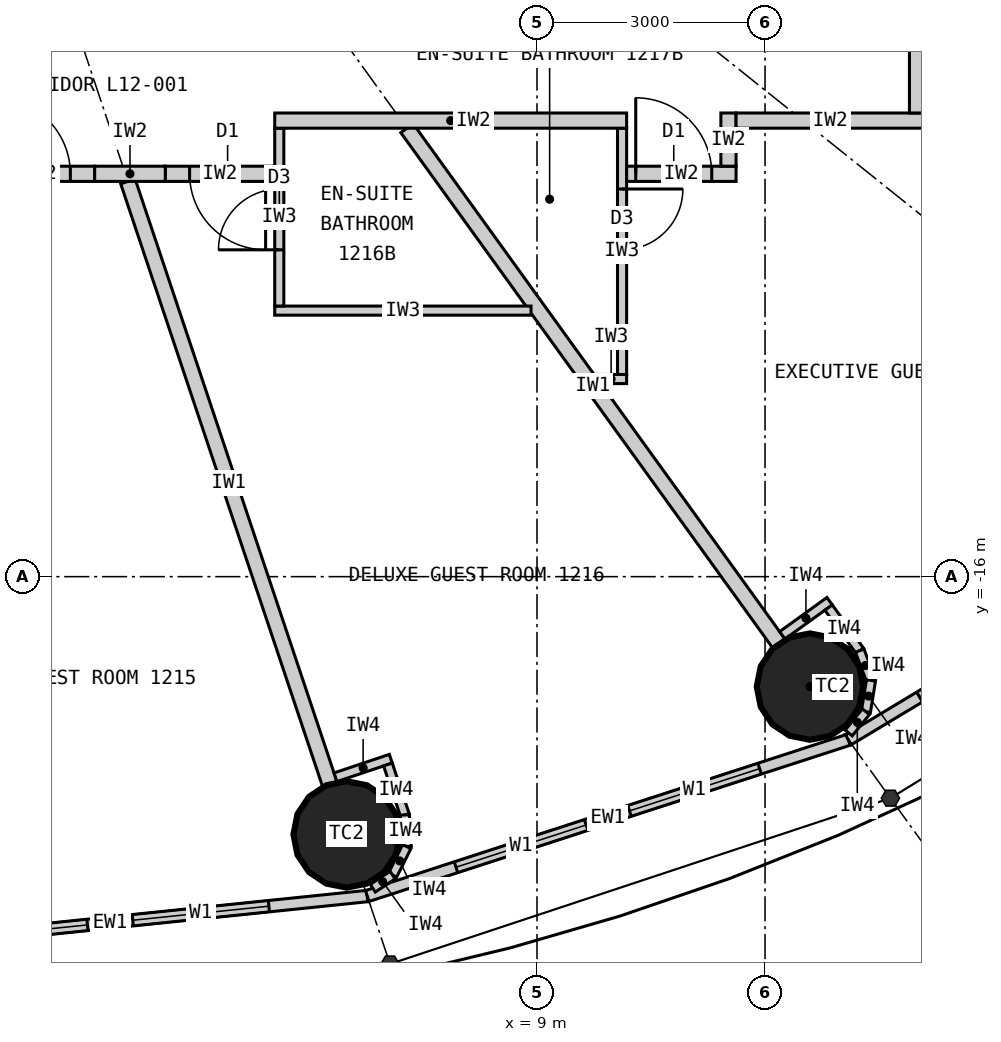
"""IFC4 building model, lengths in metres.
Left out: names, types, materials, properties, quantities, classifications, styles, units other than length and angle.
Written with IfcOpenShell. Run it as: python <this file> out.ifc"""

import sys

from ifc_helpers import new_model, si_unit, direction, frame, frame_2d, origin, origin_2d, place, context, subcontext, project, spatial, rectangle, circle, extrude, element, fill, save


model = new_model("IFC4")
c1 = context("Model", 3, precision=1e-05, world=origin(), true_north=direction((0.0, 1.0)))
c2 = subcontext(c1, "Body", "Model", "MODEL_VIEW")
j1 = project(units=[si_unit("LENGTHUNIT", "METRE"), si_unit("PLANEANGLEUNIT", "RADIAN")], contexts=[c1])
p1 = place(None, origin())
s1 = spatial("IfcSite", under=j1, at=p1, CompositionType="ELEMENT")
p2 = place(p1, origin())
s2 = spatial("IfcBuilding", under=s1, at=p2, CompositionType="ELEMENT")
p3 = place(p2, frame((0.0, 0.0, 54.0)))
s3 = spatial("IfcBuildingStorey", under=s2, at=p3, CompositionType="ELEMENT", Elevation=54.0)
for number, where, z_axis, x_axis in (
    (1, (6.495, -19.391, 0.0), (0.0, 0.0, 1.0), (1.0, 0.0, 0.0)),
    (2, (12.591, -17.447, 0.0), (0.0, 0.0, 1.0), (1.0, 0.0, 0.0)),
):
    element("IfcColumn", number, at=place(p3, frame(where, z_axis=z_axis, x_axis=x_axis)), inside=s3, PredefinedType="COLUMN", context=c2, shape_type="SweptSolid", body=[
        extrude(circle(Radius=0.7, at=origin_2d()), origin(), (0.0, 0.0, 1.0), 3.3),
    ])
p4 = place(p3, frame((0.0, -20.9, 0.0), z_axis=(0.0, 0.0, 1.0), x_axis=(0.994721394369, 0.102612609291, 0.0)))
e3 = element("IfcWall", 3, at=p4, inside=s3, PredefinedType="ELEMENTEDWALL", context=c2, shape_type="SweptSolid", body=[
    extrude(rectangle(XDim=6.802, YDim=0.15, at=frame_2d((3.401, 0.0))), origin(), (0.0, 0.0, 1.0), 3.12),
])
p5 = place(p4, frame((1.301, 0.0, 0.9)))
e4 = element("IfcOpeningElement", 4, at=p5, cuts=e3, PredefinedType="OPENING", context=c2, shape_type="SweptSolid", body=[
    extrude(rectangle(XDim=1.8, YDim=1.9, at=frame_2d((0.9, 0.95))), frame((0.0, 0.085, 0.0), z_axis=(0.0, -1.0, 0.0), x_axis=(1.0, 0.0, 0.0)), (0.0, 0.0, 1.0), 0.17),
])
p6 = place(p4, frame((3.701, 0.0, 0.9)))
e5 = element("IfcOpeningElement", 5, at=p6, cuts=e3, PredefinedType="OPENING", context=c2, shape_type="SweptSolid", body=[
    extrude(rectangle(XDim=1.8, YDim=1.9, at=frame_2d((0.9, 0.95))), frame((0.0, 0.085, 0.0), z_axis=(0.0, -1.0, 0.0), x_axis=(1.0, 0.0, 0.0)), (0.0, 0.0, 1.0), 0.17),
])
p7 = place(p3, frame((6.766, -20.202, 0.0), z_axis=(0.0, 0.0, 1.0), x_axis=(0.951137534625, 0.308767534285, 0.0)))
e6 = element("IfcWall", 6, at=p7, inside=s3, PredefinedType="ELEMENTEDWALL", context=c2, shape_type="SweptSolid", body=[
    extrude(rectangle(XDim=6.655, YDim=0.15, at=frame_2d((3.328, 0.0))), origin(), (0.0, 0.0, 1.0), 3.12),
])
p8 = place(p7, frame((1.228, 0.0, 0.9)))
e7 = element("IfcOpeningElement", 7, at=p8, cuts=e6, PredefinedType="OPENING", context=c2, shape_type="SweptSolid", body=[
    extrude(rectangle(XDim=1.8, YDim=1.9, at=frame_2d((0.9, 0.95))), frame((0.0, 0.085, 0.0), z_axis=(0.0, -1.0, 0.0), x_axis=(1.0, 0.0, 0.0)), (0.0, 0.0, 1.0), 0.17),
])
p9 = place(p7, frame((3.628, 0.0, 0.9)))
e8 = element("IfcOpeningElement", 8, at=p9, cuts=e6, PredefinedType="OPENING", context=c2, shape_type="SweptSolid", body=[
    extrude(rectangle(XDim=1.8, YDim=1.9, at=frame_2d((0.9, 0.95))), frame((0.0, 0.085, 0.0), z_axis=(0.0, -1.0, 0.0), x_axis=(1.0, 0.0, 0.0)), (0.0, 0.0, 1.0), 0.17),
])
p10 = place(p3, frame((13.096, -18.147, 0.0), z_axis=(0.0, 0.0, 1.0), x_axis=(0.856983180864, 0.515344377787, 0.0)))
e9 = element("IfcWall", 9, at=p10, inside=s3, PredefinedType="ELEMENTEDWALL", context=c2, shape_type="SweptSolid", body=[
    extrude(rectangle(XDim=6.386, YDim=0.15, at=frame_2d((3.193, 0.0))), origin(), (0.0, 0.0, 1.0), 3.12),
])
p11 = place(p10, frame((1.093, 0.0, 0.9)))
e10 = element("IfcOpeningElement", 10, at=p11, cuts=e9, PredefinedType="OPENING", context=c2, shape_type="SweptSolid", body=[
    extrude(rectangle(XDim=1.8, YDim=1.9, at=frame_2d((0.9, 0.95))), frame((0.0, 0.085, 0.0), z_axis=(0.0, -1.0, 0.0), x_axis=(1.0, 0.0, 0.0)), (0.0, 0.0, 1.0), 0.17),
])
p12 = place(p10, frame((3.493, 0.0, 0.9)))
e11 = element("IfcOpeningElement", 11, at=p12, cuts=e9, PredefinedType="OPENING", context=c2, shape_type="SweptSolid", body=[
    extrude(rectangle(XDim=1.8, YDim=1.9, at=frame_2d((0.9, 0.95))), frame((0.0, 0.085, 0.0), z_axis=(0.0, -1.0, 0.0), x_axis=(1.0, 0.0, 0.0)), (0.0, 0.0, 1.0), 0.17),
])
p13 = place(p3, frame((3.617, -10.8, 0.0), z_axis=(0.0, 0.0, 1.0), x_axis=(0.317576599239, -0.948232621046, 0.0)))
e12 = element("IfcWall", 12, at=p13, inside=s3, PredefinedType="PARTITIONING", context=c2, shape_type="SweptSolid", body=[
    extrude(rectangle(XDim=8.36, YDim=0.2, at=frame_2d((4.18, 0.0))), origin(), (0.0, 0.0, 1.0), 2.32),
])
p14 = place(p3, frame((7.289, -10.1, 0.0), z_axis=(0.0, 0.0, 1.0), x_axis=(0.585198353053, -0.810890182197, 0.0)))
e13 = element("IfcWall", 13, at=p14, inside=s3, PredefinedType="PARTITIONING", context=c2, shape_type="SweptSolid", body=[
    extrude(rectangle(XDim=8.36, YDim=0.2, at=frame_2d((4.18, 0.0))), origin(), (0.0, 0.0, 1.0), 2.32),
])
p15 = place(p3, frame((14.1, -8.639, 0.0), z_axis=(0.0, 0.0, 1.0), x_axis=(0.852672493023, -0.522445805459, 0.0)))
e14 = element("IfcWall", 14, at=p15, inside=s3, PredefinedType="PARTITIONING", context=c2, shape_type="SweptSolid", body=[
    extrude(rectangle(XDim=7.633, YDim=0.2, at=frame_2d((3.817, 0.0))), origin(), (0.0, 0.0, 1.0), 3.12),
])
p16 = place(p3, frame((8.921, -12.5, 0.0), z_axis=(0.0, 0.0, 1.0), x_axis=(-1.0, 0.0, 0.0)))
e15 = element("IfcWall", 15, at=p16, inside=s3, PredefinedType="PARTITIONING", context=c2, shape_type="SweptSolid", body=[
    extrude(rectangle(XDim=3.372, YDim=0.12, at=frame_2d((1.686, 0.0))), origin(), (0.0, 0.0, 1.0), 3.12),
])
p17 = place(p3, frame((5.609, -10.1, 0.0), z_axis=(0.0, 0.0, 1.0), x_axis=(0.0, -1.0, 0.0)))
e16 = element("IfcWall", 16, at=p17, inside=s3, PredefinedType="PARTITIONING", context=c2, shape_type="SweptSolid", body=[
    extrude(rectangle(XDim=2.34, YDim=0.12, at=frame_2d((1.17, 0.0))), origin(), (0.0, 0.0, 1.0), 3.12),
])
p18 = place(p17, frame((0.8, 0.0, 0.0)))
e17 = element("IfcOpeningElement", 17, at=p18, cuts=e16, PredefinedType="OPENING", context=c2, shape_type="SweptSolid", body=[
    extrude(rectangle(XDim=0.8, YDim=2.1, at=frame_2d((0.4, 1.05))), frame((0.0, 0.07, 0.0), z_axis=(0.0, -1.0, 0.0), x_axis=(1.0, 0.0, 0.0)), (0.0, 0.0, 1.0), 0.14),
])
p19 = place(p3, frame((9.771, -13.4, 0.0), z_axis=(0.0, 0.0, 1.0), x_axis=(1.0, 0.0, 0.0)))
e18 = element("IfcWall", 18, at=p19, inside=s3, PredefinedType="PARTITIONING", context=c2, shape_type="SweptSolid", body=[
    extrude(rectangle(XDim=0.408, YDim=0.12, at=frame_2d((0.204, 0.0))), origin(), (0.0, 0.0, 1.0), 3.12),
])
p20 = place(p3, frame((10.119, -10.1, 0.0), z_axis=(0.0, 0.0, 1.0), x_axis=(0.0, -1.0, 0.0)))
e19 = element("IfcWall", 19, at=p20, inside=s3, PredefinedType="PARTITIONING", context=c2, shape_type="SweptSolid", body=[
    extrude(rectangle(XDim=3.24, YDim=0.12, at=frame_2d((1.62, 0.0))), origin(), (0.0, 0.0, 1.0), 3.12),
])
p21 = place(p20, frame((0.8, 0.0, 0.0)))
e20 = element("IfcOpeningElement", 20, at=p21, cuts=e19, PredefinedType="OPENING", context=c2, shape_type="SweptSolid", body=[
    extrude(rectangle(XDim=0.8, YDim=2.1, at=frame_2d((0.4, 1.05))), frame((0.0, 0.07, 0.0), z_axis=(0.0, -1.0, 0.0), x_axis=(1.0, 0.0, 0.0)), (0.0, 0.0, 1.0), 0.14),
])
p22 = place(p3, frame((3.18, -10.7, 0.0), z_axis=(0.0, 0.0, 1.0), x_axis=(-1.0, 0.0, 0.0)))
e21 = element("IfcWall", 21, at=p22, inside=s3, PredefinedType="PARTITIONING", context=c2, shape_type="SweptSolid", body=[
    extrude(rectangle(XDim=1.44, YDim=0.2, at=frame_2d((0.72, 0.0))), origin(), (0.0, 0.0, 1.0), 3.12),
])
p23 = place(p22, frame((0.32, 0.0, 0.0)))
e22 = element("IfcOpeningElement", 22, at=p23, cuts=e21, PredefinedType="OPENING", context=c2, shape_type="SweptSolid", body=[
    extrude(rectangle(XDim=1.0, YDim=2.2, at=frame_2d((0.5, 1.1))), frame((0.0, 0.11, 0.0), z_axis=(0.0, -1.0, 0.0), x_axis=(1.0, 0.0, 0.0)), (0.0, 0.0, 1.0), 0.22),
])
p24 = place(p3, frame((5.549, -10.7, 0.0), z_axis=(0.0, 0.0, 1.0), x_axis=(-1.0, 0.0, 0.0)))
e23 = element("IfcWall", 23, at=p24, inside=s3, PredefinedType="PARTITIONING", context=c2, shape_type="SweptSolid", body=[
    extrude(rectangle(XDim=1.44, YDim=0.2, at=frame_2d((0.72, 0.0))), origin(), (0.0, 0.0, 1.0), 3.12),
])
p25 = place(p24, frame((0.12, 0.0, 0.0)))
e24 = element("IfcOpeningElement", 24, at=p25, cuts=e23, PredefinedType="OPENING", context=c2, shape_type="SweptSolid", body=[
    extrude(rectangle(XDim=1.0, YDim=2.2, at=frame_2d((0.5, 1.1))), frame((0.0, 0.11, 0.0), z_axis=(0.0, -1.0, 0.0), x_axis=(1.0, 0.0, 0.0)), (0.0, 0.0, 1.0), 0.22),
])
p26 = place(p3, frame((11.619, -10.7, 0.0), z_axis=(0.0, 0.0, 1.0), x_axis=(-1.0, 0.0, 0.0)))
e25 = element("IfcWall", 25, at=p26, inside=s3, PredefinedType="PARTITIONING", context=c2, shape_type="SweptSolid", body=[
    extrude(rectangle(XDim=1.44, YDim=0.2, at=frame_2d((0.72, 0.0))), origin(), (0.0, 0.0, 1.0), 3.12),
])
p27 = place(p26, frame((0.32, 0.0, 0.0)))
e26 = element("IfcOpeningElement", 26, at=p27, cuts=e25, PredefinedType="OPENING", context=c2, shape_type="SweptSolid", body=[
    extrude(rectangle(XDim=1.0, YDim=2.2, at=frame_2d((0.5, 1.1))), frame((0.0, 0.11, 0.0), z_axis=(0.0, -1.0, 0.0), x_axis=(1.0, 0.0, 0.0)), (0.0, 0.0, 1.0), 0.22),
])
p28 = place(p3, frame((11.519, -9.9, 0.0), z_axis=(0.0, 0.0, 1.0), x_axis=(0.0, -1.0, 0.0)))
e27 = element("IfcWall", 27, at=p28, inside=s3, PredefinedType="PARTITIONING", context=c2, shape_type="SweptSolid", body=[
    extrude(rectangle(XDim=0.7, YDim=0.2, at=frame_2d((0.35, 0.0))), origin(), (0.0, 0.0, 1.0), 3.12),
])
p29 = place(p3, frame((4.109, -10.7, 0.0), z_axis=(0.0, 0.0, 1.0), x_axis=(-1.0, 0.0, 0.0)))
e28 = element("IfcWall", 28, at=p29, inside=s3, PredefinedType="PARTITIONING", context=c2, shape_type="SweptSolid", body=[
    extrude(rectangle(XDim=0.929, YDim=0.2, at=frame_2d((0.465, 0.0))), origin(), (0.0, 0.0, 1.0), 3.12),
])
p30 = place(p3, frame((14.1, -10.0, 0.0), z_axis=(0.0, 0.0, 1.0), x_axis=(-1.0, 0.0, 0.0)))
e29 = element("IfcWall", 29, at=p30, inside=s3, PredefinedType="PARTITIONING", context=c2, shape_type="SweptSolid", body=[
    extrude(rectangle(XDim=2.481, YDim=0.2, at=frame_2d((1.24, 0.0))), origin(), (0.0, 0.0, 1.0), 3.12),
])
p31 = place(p3, frame((10.179, -10.0, 0.0), z_axis=(0.0, 0.0, 1.0), x_axis=(-1.0, 0.0, 0.0)))
e30 = element("IfcWall", 30, at=p31, inside=s3, PredefinedType="PARTITIONING", context=c2, shape_type="SweptSolid", body=[
    extrude(rectangle(XDim=4.63, YDim=0.2, at=frame_2d((2.315, 0.0))), origin(), (0.0, 0.0, 1.0), 3.12),
])
p32 = place(p3, frame((14.0, -9.9, 0.0), z_axis=(0.0, 0.0, 1.0), x_axis=(0.0, 1.0, 0.0)))
e31 = element("IfcWall", 31, at=p32, inside=s3, PredefinedType="PARTITIONING", context=c2, shape_type="SweptSolid", body=[
    extrude(rectangle(XDim=3.001, YDim=0.2, at=frame_2d((1.5, 0.0))), origin(), (0.0, 0.0, 1.0), 3.12),
])
p33 = place(p3, frame((6.348, -18.639, 0.0), z_axis=(0.0, 0.0, 1.0), x_axis=(0.948268951266, 0.317468102437, 0.0)))
e32 = element("IfcWall", 32, at=p33, inside=s3, PredefinedType="PARTITIONING", context=c2, shape_type="SweptSolid", body=[
    extrude(rectangle(XDim=0.768, YDim=0.12, at=frame_2d((0.384, 0.0))), origin(), (0.0, 0.0, 1.0), 3.12),
])
p34 = place(p3, frame((7.038, -18.471, 0.0), z_axis=(0.0, 0.0, 1.0), x_axis=(0.317378466199, -0.9482989556, 0.0)))
e33 = element("IfcWall", 33, at=p34, inside=s3, PredefinedType="PARTITIONING", context=c2, shape_type="SweptSolid", body=[
    extrude(rectangle(XDim=0.7, YDim=0.12, at=frame_2d((0.35, 0.0))), origin(), (0.0, 0.0, 1.0), 3.12),
])
p35 = place(p3, frame((7.26, -19.135, 0.0), z_axis=(0.0, 0.0, 1.0), x_axis=(0.0613238046, -0.99811792439, 0.0)))
e34 = element("IfcWall", 34, at=p35, inside=s3, PredefinedType="PARTITIONING", context=c2, shape_type="SweptSolid", body=[
    extrude(rectangle(XDim=0.418, YDim=0.12, at=frame_2d((0.209, 0.0))), origin(), (0.0, 0.0, 1.0), 3.12),
])
p36 = place(p3, frame((7.286, -19.552, 0.0), z_axis=(0.0, 0.0, 1.0), x_axis=(-0.445810757773, -0.89512723579, 0.0)))
e35 = element("IfcWall", 35, at=p36, inside=s3, PredefinedType="PARTITIONING", context=c2, shape_type="SweptSolid", body=[
    extrude(rectangle(XDim=0.418, YDim=0.12, at=frame_2d((0.209, 0.0))), origin(), (0.0, 0.0, 1.0), 3.12),
])
p37 = place(p3, frame((7.1, -19.926, 0.0), z_axis=(0.0, 0.0, 1.0), x_axis=(-0.833488262509, -0.552537162787, 0.0)))
e36 = element("IfcWall", 36, at=p37, inside=s3, PredefinedType="PARTITIONING", context=c2, shape_type="SweptSolid", body=[
    extrude(rectangle(XDim=0.313, YDim=0.12, at=frame_2d((0.156, 0.0))), origin(), (0.0, 0.0, 1.0), 3.12),
])
p38 = place(p3, frame((12.227, -16.772, 0.0), z_axis=(0.0, 0.0, 1.0), x_axis=(0.810821798253, 0.585293098778, 0.0)))
e37 = element("IfcWall", 37, at=p38, inside=s3, PredefinedType="PARTITIONING", context=c2, shape_type="SweptSolid", body=[
    extrude(rectangle(XDim=0.768, YDim=0.12, at=frame_2d((0.384, 0.0))), origin(), (0.0, 0.0, 1.0), 3.12),
])
p39 = place(p3, frame((12.836, -16.406, 0.0), z_axis=(0.0, 0.0, 1.0), x_axis=(0.585223113993, -0.810872312296, 0.0)))
e38 = element("IfcWall", 38, at=p39, inside=s3, PredefinedType="PARTITIONING", context=c2, shape_type="SweptSolid", body=[
    extrude(rectangle(XDim=0.7, YDim=0.12, at=frame_2d((0.35, 0.0))), origin(), (0.0, 0.0, 1.0), 3.12),
])
p40 = place(p3, frame((13.246, -16.974, 0.0), z_axis=(0.0, 0.0, 1.0), x_axis=(0.355728122235, -0.934589483705, 0.0)))
e39 = element("IfcWall", 39, at=p40, inside=s3, PredefinedType="PARTITIONING", context=c2, shape_type="SweptSolid", body=[
    extrude(rectangle(XDim=0.418, YDim=0.12, at=frame_2d((0.209, 0.0))), origin(), (0.0, 0.0, 1.0), 3.12),
])
p41 = place(p3, frame((13.394, -17.365, 0.0), z_axis=(0.0, 0.0, 1.0), x_axis=(-0.159379276926, -0.987217425943, 0.0)))
e40 = element("IfcWall", 40, at=p41, inside=s3, PredefinedType="PARTITIONING", context=c2, shape_type="SweptSolid", body=[
    extrude(rectangle(XDim=0.418, YDim=0.12, at=frame_2d((0.209, 0.0))), origin(), (0.0, 0.0, 1.0), 3.12),
])
p42 = place(p3, frame((13.328, -17.777, 0.0), z_axis=(0.0, 0.0, 1.0), x_axis=(-0.632276783541, -0.774742582407, 0.0)))
e41 = element("IfcWall", 41, at=p42, inside=s3, PredefinedType="PARTITIONING", context=c2, shape_type="SweptSolid", body=[
    extrude(rectangle(XDim=0.36, YDim=0.12, at=frame_2d((0.18, 0.0))), origin(), (0.0, 0.0, 1.0), 3.12),
])
p43 = place(p5, origin())
e42 = element("IfcWindow", 42, at=p43, inside=s3, PartitioningType="SINGLE_PANEL", PredefinedType="WINDOW", context=c2, shape_type="SweptSolid", body=[
    extrude(rectangle(XDim=1.8, YDim=1.9, at=frame_2d((0.9, 0.95))), frame((0.0, 0.03, 0.0), z_axis=(0.0, -1.0, 0.0), x_axis=(1.0, 0.0, 0.0)), (0.0, 0.0, 1.0), 0.06),
])
fill(e4, e42)
p44 = place(p6, origin())
e43 = element("IfcWindow", 43, at=p44, inside=s3, PartitioningType="SINGLE_PANEL", PredefinedType="WINDOW", context=c2, shape_type="SweptSolid", body=[
    extrude(rectangle(XDim=1.8, YDim=1.9, at=frame_2d((0.9, 0.95))), frame((0.0, 0.03, 0.0), z_axis=(0.0, -1.0, 0.0), x_axis=(1.0, 0.0, 0.0)), (0.0, 0.0, 1.0), 0.06),
])
fill(e5, e43)
p45 = place(p8, origin())
e44 = element("IfcWindow", 44, at=p45, inside=s3, PartitioningType="SINGLE_PANEL", PredefinedType="WINDOW", context=c2, shape_type="SweptSolid", body=[
    extrude(rectangle(XDim=1.8, YDim=1.9, at=frame_2d((0.9, 0.95))), frame((0.0, 0.03, 0.0), z_axis=(0.0, -1.0, 0.0), x_axis=(1.0, 0.0, 0.0)), (0.0, 0.0, 1.0), 0.06),
])
fill(e7, e44)
p46 = place(p9, origin())
e45 = element("IfcWindow", 45, at=p46, inside=s3, PartitioningType="SINGLE_PANEL", PredefinedType="WINDOW", context=c2, shape_type="SweptSolid", body=[
    extrude(rectangle(XDim=1.8, YDim=1.9, at=frame_2d((0.9, 0.95))), frame((0.0, 0.03, 0.0), z_axis=(0.0, -1.0, 0.0), x_axis=(1.0, 0.0, 0.0)), (0.0, 0.0, 1.0), 0.06),
])
fill(e8, e45)
p47 = place(p11, origin())
e46 = element("IfcWindow", 46, at=p47, inside=s3, PartitioningType="SINGLE_PANEL", PredefinedType="WINDOW", context=c2, shape_type="SweptSolid", body=[
    extrude(rectangle(XDim=1.8, YDim=1.9, at=frame_2d((0.9, 0.95))), frame((0.0, 0.03, 0.0), z_axis=(0.0, -1.0, 0.0), x_axis=(1.0, 0.0, 0.0)), (0.0, 0.0, 1.0), 0.06),
])
fill(e10, e46)
p48 = place(p23, origin())
e47 = element("IfcDoor", 47, at=p48, inside=s3, OperationType="SINGLE_SWING_RIGHT", PredefinedType="DOOR", context=c2, shape_type="SweptSolid", body=[
    extrude(rectangle(XDim=1.0, YDim=2.2, at=frame_2d((0.5, 1.1))), frame((0.0, 0.025, 0.0), z_axis=(0.0, -1.0, 0.0), x_axis=(1.0, 0.0, 0.0)), (0.0, 0.0, 1.0), 0.05),
])
fill(e22, e47)
p49 = place(p18, origin())
e48 = element("IfcDoor", 48, at=p49, inside=s3, OperationType="SINGLE_SWING_RIGHT", PredefinedType="DOOR", context=c2, shape_type="SweptSolid", body=[
    extrude(rectangle(XDim=0.8, YDim=2.1, at=frame_2d((0.4, 1.05))), frame((0.0, 0.025, 0.0), z_axis=(0.0, -1.0, 0.0), x_axis=(1.0, 0.0, 0.0)), (0.0, 0.0, 1.0), 0.05),
])
fill(e17, e48)
p50 = place(p25, origin())
e49 = element("IfcDoor", 49, at=p50, inside=s3, OperationType="SINGLE_SWING_LEFT", PredefinedType="DOOR", context=c2, shape_type="SweptSolid", body=[
    extrude(rectangle(XDim=1.0, YDim=2.2, at=frame_2d((0.5, 1.1))), frame((0.0, 0.025, 0.0), z_axis=(0.0, -1.0, 0.0), x_axis=(1.0, 0.0, 0.0)), (0.0, 0.0, 1.0), 0.05),
])
fill(e24, e49)
p51 = place(p21, origin())
e50 = element("IfcDoor", 50, at=p51, inside=s3, OperationType="SINGLE_SWING_LEFT", PredefinedType="DOOR", context=c2, shape_type="SweptSolid", body=[
    extrude(rectangle(XDim=0.8, YDim=2.1, at=frame_2d((0.4, 1.05))), frame((0.0, 0.025, 0.0), z_axis=(0.0, -1.0, 0.0), x_axis=(1.0, 0.0, 0.0)), (0.0, 0.0, 1.0), 0.05),
])
fill(e20, e50)
p52 = place(p27, origin())
e51 = element("IfcDoor", 51, at=p52, inside=s3, OperationType="SINGLE_SWING_RIGHT", PredefinedType="DOOR", context=c2, shape_type="SweptSolid", body=[
    extrude(rectangle(XDim=1.0, YDim=2.2, at=frame_2d((0.5, 1.1))), frame((0.0, 0.025, 0.0), z_axis=(0.0, -1.0, 0.0), x_axis=(1.0, 0.0, 0.0)), (0.0, 0.0, 1.0), 0.05),
])
fill(e26, e51)
save(model, sys.argv[1])
